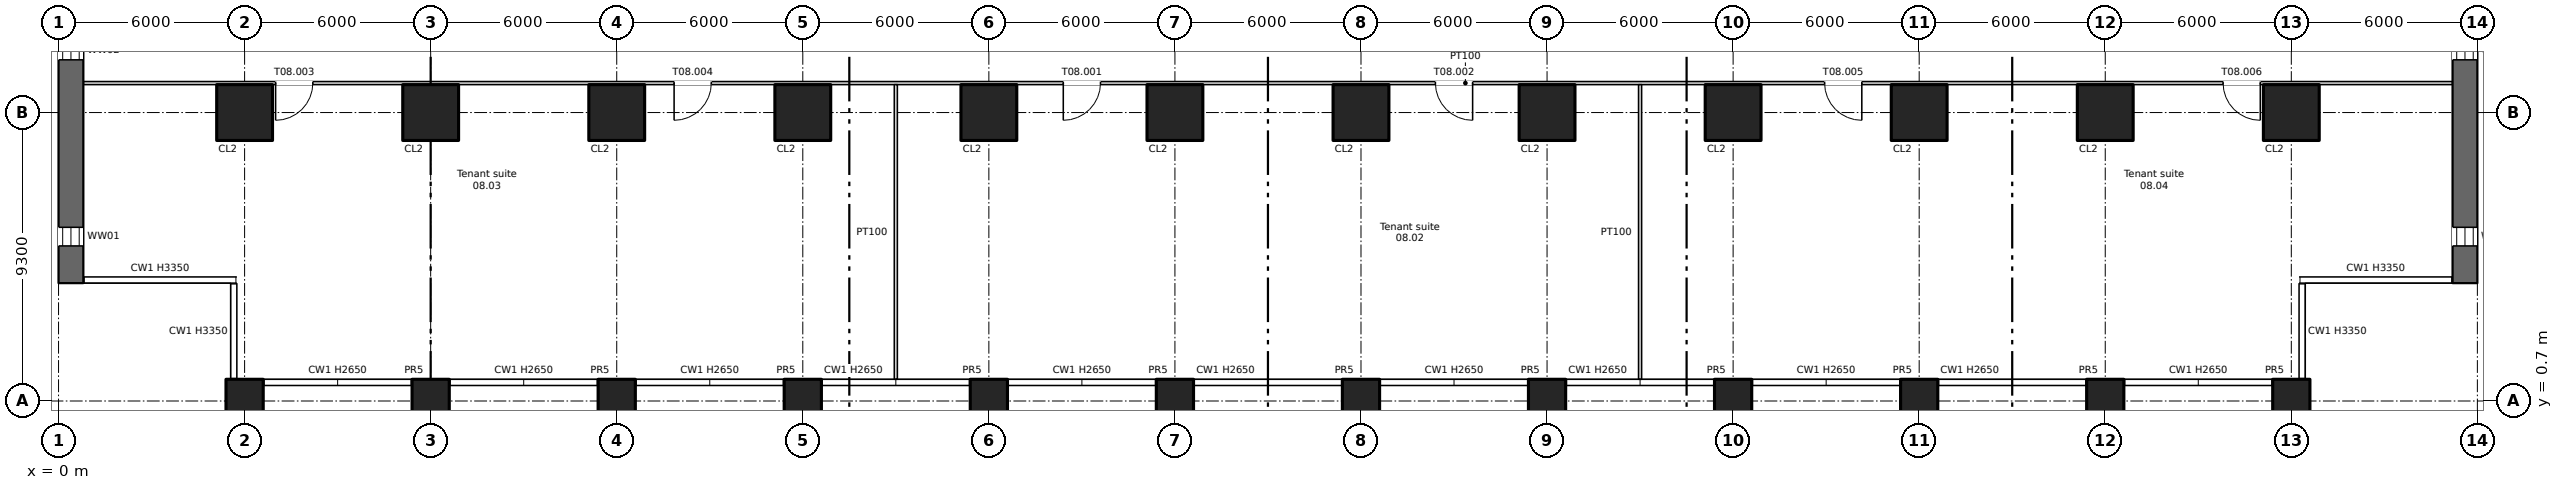
"""IFC4 building model, lengths in metres.
Left out: names, types, materials, properties, quantities, classifications, styles, units other than length and angle.
Written with IfcOpenShell. Run it as: python <this file> out.ifc"""

import sys

from ifc_helpers import new_model, si_unit, direction, frame, frame_2d, origin, origin_2d, place, context, subcontext, project, spatial, rectangle, extrude, element, fill, save


model = new_model("IFC4")
c1 = context("Model", 3, precision=1e-05, world=origin(), true_north=direction((0.0, 1.0)))
c2 = subcontext(c1, "Body", "Model", "MODEL_VIEW")
j1 = project(units=[si_unit("LENGTHUNIT", "METRE"), si_unit("PLANEANGLEUNIT", "RADIAN")], contexts=[c1])
p1 = place(None, origin())
s1 = spatial("IfcSite", under=j1, at=p1, CompositionType="ELEMENT")
p2 = place(p1, origin())
s2 = spatial("IfcBuilding", under=s1, at=p2, CompositionType="ELEMENT")
p3 = place(p2, frame((0.0, 0.0, 30.0)))
s3 = spatial("IfcBuildingStorey", under=s2, at=p3, CompositionType="ELEMENT", Elevation=30.0)
for number, where, z_axis, x_axis in (
    (1, (6.0, 0.7, -0.4), (0.0, 0.0, 1.0), (1.0, 0.0, 0.0)),
    (2, (12.0, 0.7, -0.4), (0.0, 0.0, 1.0), (1.0, 0.0, 0.0)),
    (3, (18.0, 0.7, -0.4), (0.0, 0.0, 1.0), (1.0, 0.0, 0.0)),
    (4, (24.0, 0.7, -0.4), (0.0, 0.0, 1.0), (1.0, 0.0, 0.0)),
    (5, (30.0, 0.7, -0.4), (0.0, 0.0, 1.0), (1.0, 0.0, 0.0)),
    (6, (36.0, 0.7, -0.4), (0.0, 0.0, 1.0), (1.0, 0.0, 0.0)),
    (7, (42.0, 0.7, -0.4), (0.0, 0.0, 1.0), (1.0, 0.0, 0.0)),
    (8, (48.0, 0.7, -0.4), (0.0, 0.0, 1.0), (1.0, 0.0, 0.0)),
    (9, (54.0, 0.7, -0.4), (0.0, 0.0, 1.0), (1.0, 0.0, 0.0)),
    (10, (60.0, 0.7, -0.4), (0.0, 0.0, 1.0), (1.0, 0.0, 0.0)),
    (11, (66.0, 0.7, -0.4), (0.0, 0.0, 1.0), (1.0, 0.0, 0.0)),
    (12, (72.0, 0.7, -0.4), (0.0, 0.0, 1.0), (1.0, 0.0, 0.0)),
):
    element("IfcColumn", number, at=place(p3, frame(where, z_axis=z_axis, x_axis=x_axis)), inside=s3, PredefinedType="COLUMN", context=c2, shape_type="SweptSolid", body=[
        extrude(rectangle(XDim=1.2, YDim=1.4, at=origin_2d()), origin(), (0.0, 0.0, 1.0), 3.75),
    ])
for number, where, z_axis, x_axis in (
    (13, (6.0, 10.0, 0.0), (0.0, 0.0, 1.0), (1.0, 0.0, 0.0)),
    (14, (12.0, 10.0, 0.0), (0.0, 0.0, 1.0), (1.0, 0.0, 0.0)),
    (15, (18.0, 10.0, 0.0), (0.0, 0.0, 1.0), (1.0, 0.0, 0.0)),
    (16, (24.0, 10.0, 0.0), (0.0, 0.0, 1.0), (1.0, 0.0, 0.0)),
    (17, (30.0, 10.0, 0.0), (0.0, 0.0, 1.0), (1.0, 0.0, 0.0)),
    (18, (36.0, 10.0, 0.0), (0.0, 0.0, 1.0), (1.0, 0.0, 0.0)),
    (19, (42.0, 10.0, 0.0), (0.0, 0.0, 1.0), (1.0, 0.0, 0.0)),
    (20, (48.0, 10.0, 0.0), (0.0, 0.0, 1.0), (1.0, 0.0, 0.0)),
    (21, (54.0, 10.0, 0.0), (0.0, 0.0, 1.0), (1.0, 0.0, 0.0)),
    (22, (60.0, 10.0, 0.0), (0.0, 0.0, 1.0), (1.0, 0.0, 0.0)),
    (23, (66.0, 10.0, 0.0), (0.0, 0.0, 1.0), (1.0, 0.0, 0.0)),
    (24, (72.0, 10.0, 0.0), (0.0, 0.0, 1.0), (1.0, 0.0, 0.0)),
):
    element("IfcColumn", number, at=place(p3, frame(where, z_axis=z_axis, x_axis=x_axis)), inside=s3, PredefinedType="COLUMN", context=c2, shape_type="SweptSolid", body=[
        extrude(rectangle(XDim=1.8, YDim=1.8, at=origin_2d()), origin(), (0.0, 0.0, 1.0), 3.35),
    ])
p4 = place(p3, frame((0.4, 4.5, 0.0), z_axis=(0.0, 0.0, 1.0), x_axis=(0.0, 1.0, 0.0)))
e25 = element("IfcWall", 25, at=p4, inside=s3, PredefinedType="SHEAR", context=c2, shape_type="SweptSolid", body=[
    extrude(rectangle(XDim=37.0, YDim=0.8, at=frame_2d((18.5, 0.0))), origin(), (0.0, 0.0, 1.0), 3.35),
])
p5 = place(p4, frame((1.2, 0.0, 0.6)))
e26 = element("IfcOpeningElement", 26, at=p5, cuts=e25, PredefinedType="OPENING", context=c2, shape_type="SweptSolid", body=[
    extrude(rectangle(XDim=0.6, YDim=2.4, at=frame_2d((0.3, 1.2))), frame((0.0, 0.41, 0.0), z_axis=(0.0, -1.0, 0.0), x_axis=(1.0, 0.0, 0.0)), (0.0, 0.0, 1.0), 0.82),
])
p6 = place(p4, frame((7.2, 0.0, 0.6)))
e27 = element("IfcOpeningElement", 27, at=p6, cuts=e25, PredefinedType="OPENING", context=c2, shape_type="SweptSolid", body=[
    extrude(rectangle(XDim=0.6, YDim=2.4, at=frame_2d((0.3, 1.2))), frame((0.0, 0.41, 0.0), z_axis=(0.0, -1.0, 0.0), x_axis=(1.0, 0.0, 0.0)), (0.0, 0.0, 1.0), 0.82),
])
p7 = place(p4, frame((13.2, 0.0, 0.6)))
e28 = element("IfcOpeningElement", 28, at=p7, cuts=e25, PredefinedType="OPENING", context=c2, shape_type="SweptSolid", body=[
    extrude(rectangle(XDim=0.6, YDim=2.4, at=frame_2d((0.3, 1.2))), frame((0.0, 0.41, 0.0), z_axis=(0.0, -1.0, 0.0), x_axis=(1.0, 0.0, 0.0)), (0.0, 0.0, 1.0), 0.82),
])
p8 = place(p4, frame((19.2, 0.0, 0.6)))
e29 = element("IfcOpeningElement", 29, at=p8, cuts=e25, PredefinedType="OPENING", context=c2, shape_type="SweptSolid", body=[
    extrude(rectangle(XDim=0.6, YDim=2.4, at=frame_2d((0.3, 1.2))), frame((0.0, 0.41, 0.0), z_axis=(0.0, -1.0, 0.0), x_axis=(1.0, 0.0, 0.0)), (0.0, 0.0, 1.0), 0.82),
])
p9 = place(p4, frame((25.2, 0.0, 0.6)))
e30 = element("IfcOpeningElement", 30, at=p9, cuts=e25, PredefinedType="OPENING", context=c2, shape_type="SweptSolid", body=[
    extrude(rectangle(XDim=0.6, YDim=2.4, at=frame_2d((0.3, 1.2))), frame((0.0, 0.41, 0.0), z_axis=(0.0, -1.0, 0.0), x_axis=(1.0, 0.0, 0.0)), (0.0, 0.0, 1.0), 0.82),
])
p10 = place(p4, frame((31.2, 0.0, 0.6)))
e31 = element("IfcOpeningElement", 31, at=p10, cuts=e25, PredefinedType="OPENING", context=c2, shape_type="SweptSolid", body=[
    extrude(rectangle(XDim=0.6, YDim=2.4, at=frame_2d((0.3, 1.2))), frame((0.0, 0.41, 0.0), z_axis=(0.0, -1.0, 0.0), x_axis=(1.0, 0.0, 0.0)), (0.0, 0.0, 1.0), 0.82),
])
p11 = place(p3, frame((77.6, 4.5, 0.0), z_axis=(0.0, 0.0, 1.0), x_axis=(0.0, 1.0, 0.0)))
e32 = element("IfcWall", 32, at=p11, inside=s3, PredefinedType="SHEAR", context=c2, shape_type="SweptSolid", body=[
    extrude(rectangle(XDim=37.0, YDim=0.8, at=frame_2d((18.5, 0.0))), origin(), (0.0, 0.0, 1.0), 3.35),
])
p12 = place(p11, frame((1.2, 0.0, 0.6)))
e33 = element("IfcOpeningElement", 33, at=p12, cuts=e32, PredefinedType="OPENING", context=c2, shape_type="SweptSolid", body=[
    extrude(rectangle(XDim=0.6, YDim=2.4, at=frame_2d((0.3, 1.2))), frame((0.0, 0.41, 0.0), z_axis=(0.0, -1.0, 0.0), x_axis=(1.0, 0.0, 0.0)), (0.0, 0.0, 1.0), 0.82),
])
p13 = place(p11, frame((7.2, 0.0, 0.6)))
e34 = element("IfcOpeningElement", 34, at=p13, cuts=e32, PredefinedType="OPENING", context=c2, shape_type="SweptSolid", body=[
    extrude(rectangle(XDim=0.6, YDim=2.4, at=frame_2d((0.3, 1.2))), frame((0.0, 0.41, 0.0), z_axis=(0.0, -1.0, 0.0), x_axis=(1.0, 0.0, 0.0)), (0.0, 0.0, 1.0), 0.82),
])
p14 = place(p11, frame((13.2, 0.0, 0.6)))
e35 = element("IfcOpeningElement", 35, at=p14, cuts=e32, PredefinedType="OPENING", context=c2, shape_type="SweptSolid", body=[
    extrude(rectangle(XDim=0.6, YDim=2.4, at=frame_2d((0.3, 1.2))), frame((0.0, 0.41, 0.0), z_axis=(0.0, -1.0, 0.0), x_axis=(1.0, 0.0, 0.0)), (0.0, 0.0, 1.0), 0.82),
])
p15 = place(p11, frame((19.2, 0.0, 0.6)))
e36 = element("IfcOpeningElement", 36, at=p15, cuts=e32, PredefinedType="OPENING", context=c2, shape_type="SweptSolid", body=[
    extrude(rectangle(XDim=0.6, YDim=2.4, at=frame_2d((0.3, 1.2))), frame((0.0, 0.41, 0.0), z_axis=(0.0, -1.0, 0.0), x_axis=(1.0, 0.0, 0.0)), (0.0, 0.0, 1.0), 0.82),
])
p16 = place(p11, frame((25.2, 0.0, 0.6)))
e37 = element("IfcOpeningElement", 37, at=p16, cuts=e32, PredefinedType="OPENING", context=c2, shape_type="SweptSolid", body=[
    extrude(rectangle(XDim=0.6, YDim=2.4, at=frame_2d((0.3, 1.2))), frame((0.0, 0.41, 0.0), z_axis=(0.0, -1.0, 0.0), x_axis=(1.0, 0.0, 0.0)), (0.0, 0.0, 1.0), 0.82),
])
p17 = place(p11, frame((31.2, 0.0, 0.6)))
e38 = element("IfcOpeningElement", 38, at=p17, cuts=e32, PredefinedType="OPENING", context=c2, shape_type="SweptSolid", body=[
    extrude(rectangle(XDim=0.6, YDim=2.4, at=frame_2d((0.3, 1.2))), frame((0.0, 0.41, 0.0), z_axis=(0.0, -1.0, 0.0), x_axis=(1.0, 0.0, 0.0)), (0.0, 0.0, 1.0), 0.82),
])
p18 = place(p3, frame((0.8, 10.95, 0.0), z_axis=(0.0, 0.0, 1.0), x_axis=(1.0, 0.0, 0.0)))
e39 = element("IfcWall", 39, at=p18, inside=s3, PredefinedType="PARTITIONING", context=c2, shape_type="SweptSolid", body=[
    extrude(rectangle(XDim=76.4, YDim=0.1, at=frame_2d((38.2, 0.0))), origin(), (0.0, 0.0, 1.0), 3.35),
])
p19 = place(p18, frame((31.6, 0.0, 0.0)))
e40 = element("IfcOpeningElement", 40, at=p19, cuts=e39, PredefinedType="OPENING", context=c2, shape_type="SweptSolid", body=[
    extrude(rectangle(XDim=1.2, YDim=2.1, at=frame_2d((0.6, 1.05))), frame((0.0, 0.06, 0.0), z_axis=(0.0, -1.0, 0.0), x_axis=(1.0, 0.0, 0.0)), (0.0, 0.0, 1.0), 0.12),
])
p20 = place(p18, frame((43.6, 0.0, 0.0)))
e41 = element("IfcOpeningElement", 41, at=p20, cuts=e39, PredefinedType="OPENING", context=c2, shape_type="SweptSolid", body=[
    extrude(rectangle(XDim=1.2, YDim=2.1, at=frame_2d((0.6, 1.05))), frame((0.0, 0.06, 0.0), z_axis=(0.0, -1.0, 0.0), x_axis=(1.0, 0.0, 0.0)), (0.0, 0.0, 1.0), 0.12),
])
p21 = place(p18, frame((6.2, 0.0, 0.0)))
e42 = element("IfcOpeningElement", 42, at=p21, cuts=e39, PredefinedType="OPENING", context=c2, shape_type="SweptSolid", body=[
    extrude(rectangle(XDim=1.2, YDim=2.1, at=frame_2d((0.6, 1.05))), frame((0.0, 0.06, 0.0), z_axis=(0.0, -1.0, 0.0), x_axis=(1.0, 0.0, 0.0)), (0.0, 0.0, 1.0), 0.12),
])
p22 = place(p18, frame((19.05, 0.0, 0.0)))
e43 = element("IfcOpeningElement", 43, at=p22, cuts=e39, PredefinedType="OPENING", context=c2, shape_type="SweptSolid", body=[
    extrude(rectangle(XDim=1.2, YDim=2.1, at=frame_2d((0.6, 1.05))), frame((0.0, 0.06, 0.0), z_axis=(0.0, -1.0, 0.0), x_axis=(1.0, 0.0, 0.0)), (0.0, 0.0, 1.0), 0.12),
])
p23 = place(p18, frame((56.15, 0.0, 0.0)))
e44 = element("IfcOpeningElement", 44, at=p23, cuts=e39, PredefinedType="OPENING", context=c2, shape_type="SweptSolid", body=[
    extrude(rectangle(XDim=1.2, YDim=2.1, at=frame_2d((0.6, 1.05))), frame((0.0, 0.06, 0.0), z_axis=(0.0, -1.0, 0.0), x_axis=(1.0, 0.0, 0.0)), (0.0, 0.0, 1.0), 0.12),
])
p24 = place(p18, frame((69.0, 0.0, 0.0)))
e45 = element("IfcOpeningElement", 45, at=p24, cuts=e39, PredefinedType="OPENING", context=c2, shape_type="SweptSolid", body=[
    extrude(rectangle(XDim=1.2, YDim=2.1, at=frame_2d((0.6, 1.05))), frame((0.0, 0.06, 0.0), z_axis=(0.0, -1.0, 0.0), x_axis=(1.0, 0.0, 0.0)), (0.0, 0.0, 1.0), 0.12),
])
for number, where, z_axis, x_axis in (
    (46, (27.0, 1.4, 0.0), (0.0, 0.0, 1.0), (0.0, 1.0, 0.0)),
    (47, (51.0, 1.4, 0.0), (0.0, 0.0, 1.0), (0.0, 1.0, 0.0)),
):
    element("IfcWall", number, at=place(p3, frame(where, z_axis=z_axis, x_axis=x_axis)), inside=s3, PredefinedType="PARTITIONING", context=c2, shape_type="SweptSolid", body=[
        extrude(rectangle(XDim=9.5, YDim=0.1, at=frame_2d((4.75, 0.0))), origin(), (0.0, 0.0, 1.0), 3.35),
    ])
p25 = place(p5, origin())
e48 = element("IfcWindow", 48, at=p25, inside=s3, PartitioningType="SINGLE_PANEL", PredefinedType="WINDOW", context=c2, shape_type="SweptSolid", body=[
    extrude(rectangle(XDim=0.6, YDim=2.4, at=frame_2d((0.3, 1.2))), frame((0.0, 0.03, 0.0), z_axis=(0.0, -1.0, 0.0), x_axis=(1.0, 0.0, 0.0)), (0.0, 0.0, 1.0), 0.06),
])
fill(e26, e48)
p26 = place(p6, origin())
e49 = element("IfcWindow", 49, at=p26, inside=s3, PartitioningType="SINGLE_PANEL", PredefinedType="WINDOW", context=c2, shape_type="SweptSolid", body=[
    extrude(rectangle(XDim=0.6, YDim=2.4, at=frame_2d((0.3, 1.2))), frame((0.0, 0.03, 0.0), z_axis=(0.0, -1.0, 0.0), x_axis=(1.0, 0.0, 0.0)), (0.0, 0.0, 1.0), 0.06),
])
fill(e27, e49)
p27 = place(p12, origin())
e50 = element("IfcWindow", 50, at=p27, inside=s3, PartitioningType="SINGLE_PANEL", PredefinedType="WINDOW", context=c2, shape_type="SweptSolid", body=[
    extrude(rectangle(XDim=0.6, YDim=2.4, at=frame_2d((0.3, 1.2))), frame((0.0, 0.03, 0.0), z_axis=(0.0, -1.0, 0.0), x_axis=(1.0, 0.0, 0.0)), (0.0, 0.0, 1.0), 0.06),
])
fill(e33, e50)
p28 = place(p13, origin())
e51 = element("IfcWindow", 51, at=p28, inside=s3, PartitioningType="SINGLE_PANEL", PredefinedType="WINDOW", context=c2, shape_type="SweptSolid", body=[
    extrude(rectangle(XDim=0.6, YDim=2.4, at=frame_2d((0.3, 1.2))), frame((0.0, 0.03, 0.0), z_axis=(0.0, -1.0, 0.0), x_axis=(1.0, 0.0, 0.0)), (0.0, 0.0, 1.0), 0.06),
])
fill(e34, e51)
p29 = place(p19, origin())
e52 = element("IfcDoor", 52, at=p29, inside=s3, OperationType="SINGLE_SWING_LEFT", PredefinedType="DOOR", context=c2, shape_type="SweptSolid", body=[
    extrude(rectangle(XDim=1.2, YDim=2.1, at=frame_2d((0.6, 1.05))), frame((0.0, 0.025, 0.0), z_axis=(0.0, -1.0, 0.0), x_axis=(1.0, 0.0, 0.0)), (0.0, 0.0, 1.0), 0.05),
])
fill(e40, e52)
p30 = place(p20, origin())
e53 = element("IfcDoor", 53, at=p30, inside=s3, OperationType="SINGLE_SWING_RIGHT", PredefinedType="DOOR", context=c2, shape_type="SweptSolid", body=[
    extrude(rectangle(XDim=1.2, YDim=2.1, at=frame_2d((0.6, 1.05))), frame((0.0, 0.025, 0.0), z_axis=(0.0, -1.0, 0.0), x_axis=(1.0, 0.0, 0.0)), (0.0, 0.0, 1.0), 0.05),
])
fill(e41, e53)
p31 = place(p21, origin())
e54 = element("IfcDoor", 54, at=p31, inside=s3, OperationType="SINGLE_SWING_LEFT", PredefinedType="DOOR", context=c2, shape_type="SweptSolid", body=[
    extrude(rectangle(XDim=1.2, YDim=2.1, at=frame_2d((0.6, 1.05))), frame((0.0, 0.025, 0.0), z_axis=(0.0, -1.0, 0.0), x_axis=(1.0, 0.0, 0.0)), (0.0, 0.0, 1.0), 0.05),
])
fill(e42, e54)
p32 = place(p22, origin())
e55 = element("IfcDoor", 55, at=p32, inside=s3, OperationType="SINGLE_SWING_LEFT", PredefinedType="DOOR", context=c2, shape_type="SweptSolid", body=[
    extrude(rectangle(XDim=1.2, YDim=2.1, at=frame_2d((0.6, 1.05))), frame((0.0, 0.025, 0.0), z_axis=(0.0, -1.0, 0.0), x_axis=(1.0, 0.0, 0.0)), (0.0, 0.0, 1.0), 0.05),
])
fill(e43, e55)
p33 = place(p23, origin())
e56 = element("IfcDoor", 56, at=p33, inside=s3, OperationType="SINGLE_SWING_RIGHT", PredefinedType="DOOR", context=c2, shape_type="SweptSolid", body=[
    extrude(rectangle(XDim=1.2, YDim=2.1, at=frame_2d((0.6, 1.05))), frame((0.0, 0.025, 0.0), z_axis=(0.0, -1.0, 0.0), x_axis=(1.0, 0.0, 0.0)), (0.0, 0.0, 1.0), 0.05),
])
fill(e44, e56)
p34 = place(p24, origin())
e57 = element("IfcDoor", 57, at=p34, inside=s3, OperationType="SINGLE_SWING_RIGHT", PredefinedType="DOOR", context=c2, shape_type="SweptSolid", body=[
    extrude(rectangle(XDim=1.2, YDim=2.1, at=frame_2d((0.6, 1.05))), frame((0.0, 0.025, 0.0), z_axis=(0.0, -1.0, 0.0), x_axis=(1.0, 0.0, 0.0)), (0.0, 0.0, 1.0), 0.05),
])
fill(e45, e57)
save(model, sys.argv[1])
